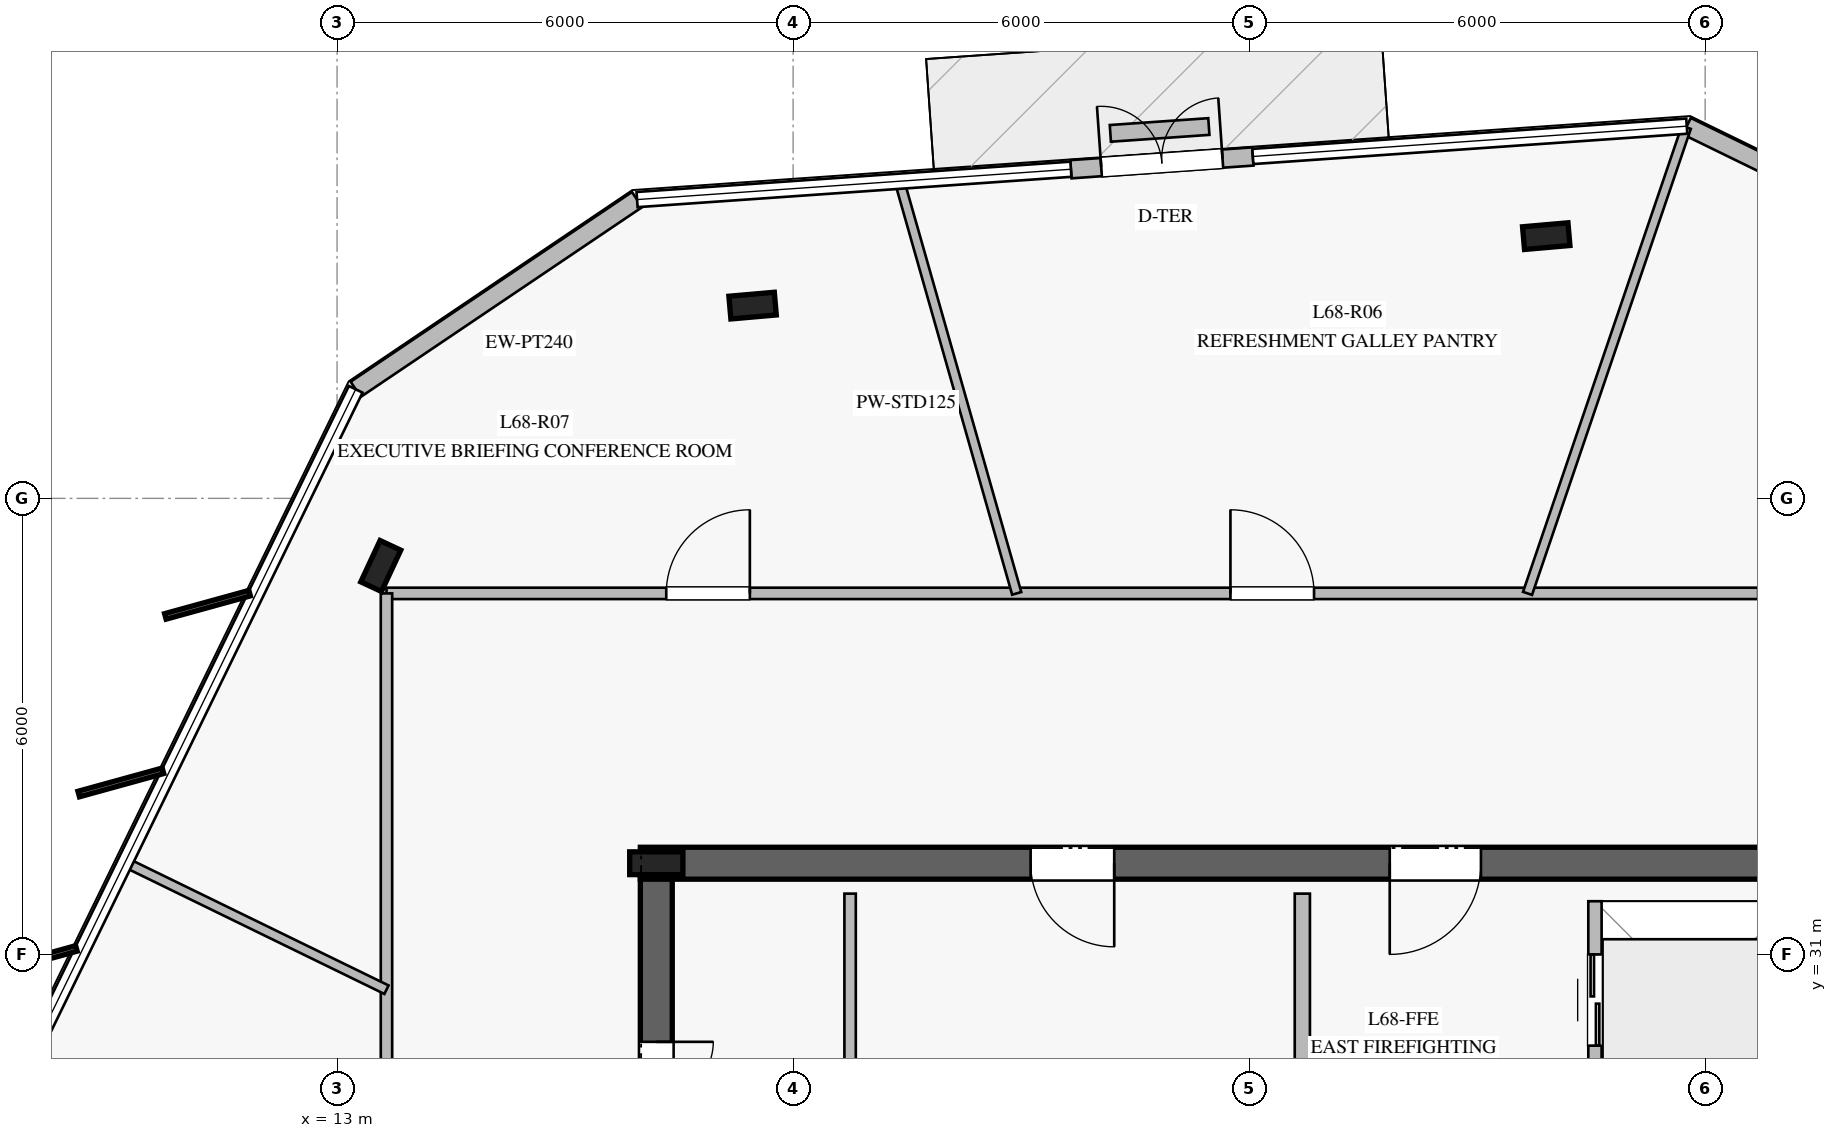
"""IFC4 building model, lengths in metres.
Left out: names, types, materials, properties, quantities, classifications, styles, units other than length and angle.
Written with IfcOpenShell. Run it as: python <this file> out.ifc"""

import sys

from ifc_helpers import new_model, si_unit, direction, frame, frame_2d, origin, origin_2d, place, context, subcontext, project, spatial, rectangle, i_section, extrude, element, fill, save


model = new_model("IFC4")
c1 = context("Model", 3, precision=1e-05, world=origin(), true_north=direction((0.0, 1.0)))
c2 = subcontext(c1, "Body", "Model", "MODEL_VIEW")
j1 = project(units=[si_unit("LENGTHUNIT", "METRE"), si_unit("PLANEANGLEUNIT", "RADIAN")], contexts=[c1])
p1 = place(None, origin())
s1 = spatial("IfcSite", under=j1, at=p1, CompositionType="ELEMENT")
p2 = place(p1, origin())
s2 = spatial("IfcBuilding", under=s1, at=p2, CompositionType="ELEMENT")
p3 = place(p2, frame((0.0, 0.0, 282.2)))
s3 = spatial("IfcBuildingStorey", under=s2, at=p3, CompositionType="ELEMENT", Elevation=282.2)
p4 = place(p3, frame((33.01, 32.2, 0.0), z_axis=(0.0, 0.0, 1.0), x_axis=(-1.0, 0.0, 0.0)))
e1 = element("IfcWall", 1, at=p4, inside=s3, PredefinedType="SHEAR", context=c2, shape_type="SweptSolid", body=[
    extrude(rectangle(XDim=16.02, YDim=0.42, at=frame_2d((8.01, 0.0))), origin(), (0.0, 0.0, 1.0), 3.78),
])
p5 = place(p4, frame((4.96, 0.0, 0.0)))
e2 = element("IfcOpeningElement", 2, at=p5, cuts=e1, PredefinedType="OPENING", context=c2, shape_type="SweptSolid", body=[
    extrude(rectangle(XDim=1.2, YDim=2.25, at=frame_2d((0.6, 1.125))), frame((0.0, 0.22, 0.0), z_axis=(0.0, -1.0, 0.0), x_axis=(1.0, 0.0, 0.0)), (0.0, 0.0, 1.0), 0.44),
])
p6 = place(p4, frame((9.785, 0.0, 0.0)))
e3 = element("IfcOpeningElement", 3, at=p6, cuts=e1, PredefinedType="OPENING", context=c2, shape_type="SweptSolid", body=[
    extrude(rectangle(XDim=1.1, YDim=2.2, at=frame_2d((0.55, 1.1))), frame((0.0, 0.22, 0.0), z_axis=(0.0, -1.0, 0.0), x_axis=(1.0, 0.0, 0.0)), (0.0, 0.0, 1.0), 0.44),
])
p7 = place(p3, frame((17.2, 31.99, 0.0), z_axis=(0.0, 0.0, 1.0), x_axis=(0.0, -1.0, 0.0)))
e4 = element("IfcWall", 4, at=p7, inside=s3, PredefinedType="SHEAR", context=c2, shape_type="SweptSolid", body=[
    extrude(rectangle(XDim=13.98, YDim=0.42, at=frame_2d((6.99, 0.0))), origin(), (0.0, 0.0, 1.0), 3.78),
])
p8 = place(p7, frame((2.14, 0.0, 0.0)))
e5 = element("IfcOpeningElement", 5, at=p8, cuts=e4, PredefinedType="OPENING", context=c2, shape_type="SweptSolid", body=[
    extrude(rectangle(XDim=1.5, YDim=2.2, at=frame_2d((0.75, 1.1))), frame((0.0, 0.22, 0.0), z_axis=(0.0, -1.0, 0.0), x_axis=(1.0, 0.0, 0.0)), (0.0, 0.0, 1.0), 0.44),
])
p9 = place(p3, frame((17.2, 32.2, 0.0), z_axis=(0.0, 0.0, 1.0), x_axis=(1.0, 0.0, 0.0)))
e6 = element("IfcColumn", 6, at=p9, inside=s3, PredefinedType="COLUMN", context=c2, shape_type="SweptSolid", body=[
    extrude(i_section(OverallWidth=0.3, OverallDepth=0.7, WebThickness=0.017, FlangeThickness=0.032, at=origin_2d()), origin(), (0.0, 0.0, 1.0), 4.0),
])
for number, where, z_axis, x_axis in (
    (7, (28.909, 40.45, 0.0), (0.0, 0.0, 1.0), (0.996, 0.087, 0.0)),
    (8, (18.467, 39.536, 0.0), (0.0, 0.0, 1.0), (0.996, 0.087, 0.0)),
    (9, (13.575, 36.11, 0.0), (0.0, 0.0, 1.0), (0.423, 0.906, 0.0)),
):
    element("IfcColumn", number, at=place(p3, frame(where, z_axis=z_axis, x_axis=x_axis)), inside=s3, PredefinedType="COLUMN", context=c2, shape_type="SweptSolid", body=[
        extrude(i_section(OverallWidth=0.3, OverallDepth=0.6, WebThickness=0.015, FlangeThickness=0.03, at=origin_2d()), origin(), (0.0, 0.0, 1.0), 4.0),
    ])
p10 = place(p3, frame((25.049, 41.498, 0.0), z_axis=(0.0, 0.0, 1.0), x_axis=(-0.99754775803, -0.069989073784, 0.0)))
e10 = element("IfcWall", 10, at=p10, inside=s3, PredefinedType="STANDARD", context=c2, shape_type="SweptSolid", body=[
    extrude(rectangle(XDim=2.4, YDim=0.24, at=frame_2d((1.2, 0.0))), origin(), (0.0, 0.0, 1.0), 3.78),
])
p11 = place(p10, frame((0.4, 0.0, 0.0)))
e11 = element("IfcOpeningElement", 11, at=p11, cuts=e10, PredefinedType="OPENING", context=c2, shape_type="SweptSolid", body=[
    extrude(rectangle(XDim=1.6, YDim=2.25, at=frame_2d((0.8, 1.125))), frame((0.0, 0.13, 0.0), z_axis=(0.0, -1.0, 0.0), x_axis=(1.0, 0.0, 0.0)), (0.0, 0.0, 1.0), 0.26),
])
p12 = place(p3, frame((16.947, 40.931, 0.0), z_axis=(0.0, 0.0, 1.0), x_axis=(-0.829153473241, -0.559021035214, 0.0)))
e12 = element("IfcWall", 12, at=p12, inside=s3, PredefinedType="STANDARD", context=c2, shape_type="SweptSolid", body=[
    extrude(rectangle(XDim=4.465, YDim=0.24, at=frame_2d((2.232, 0.0))), origin(), (0.0, 0.0, 1.0), 3.78),
])
p13 = place(p3, frame((34.77, 39.94, 0.0), z_axis=(0.0, 0.0, 1.0), x_axis=(-0.898770548201, 0.438419321754, 0.0)))
e13 = element("IfcWall", 13, at=p13, inside=s3, PredefinedType="STANDARD", context=c2, shape_type="SweptSolid", body=[
    extrude(rectangle(XDim=4.464, YDim=0.24, at=frame_2d((2.232, 0.0))), origin(), (0.0, 0.0, 1.0), 3.78),
])
p14 = place(p3, frame((24.47, 41.892, 0.0), z_axis=(0.0, 0.0, 1.0), x_axis=(-0.997592367101, -0.069350335995, 0.0)))
e14 = element("IfcWall", 14, at=p14, inside=s3, PredefinedType="USERDEFINED", context=c2, shape_type="SweptSolid", body=[
    extrude(rectangle(XDim=1.299, YDim=0.22, at=frame_2d((0.649, 0.0))), origin(), (0.0, 0.0, 1.0), 0.4),
])
p15 = place(p3, frame((25.7, 26.65, 0.0), z_axis=(0.0, 0.0, 1.0), x_axis=(0.0, 1.0, 0.0)))
e15 = element("IfcWall", 15, at=p15, inside=s3, PredefinedType="PARTITIONING", context=c2, shape_type="SweptSolid", body=[
    extrude(rectangle(XDim=5.15, YDim=0.2, at=frame_2d((2.575, 0.0))), origin(), (0.0, 0.0, 1.0), 3.78),
])
p16 = place(p3, frame((19.75, 29.39, 0.0), z_axis=(0.0, 0.0, 1.0), x_axis=(0.0, 1.0, 0.0)))
e16 = element("IfcWall", 16, at=p16, inside=s3, PredefinedType="PARTITIONING", context=c2, shape_type="SweptSolid", body=[
    extrude(rectangle(XDim=2.41, YDim=0.15, at=frame_2d((1.205, 0.0))), origin(), (0.0, 0.0, 1.0), 3.78),
])
p17 = place(p3, frame((29.55, 29.1, 0.0), z_axis=(0.0, 0.0, 1.0), x_axis=(0.0, 1.0, 0.0)))
e17 = element("IfcWall", 17, at=p17, inside=s3, PredefinedType="PARTITIONING", context=c2, shape_type="SweptSolid", body=[
    extrude(rectangle(XDim=2.6, YDim=0.175, at=frame_2d((1.3, 0.0))), origin(), (0.0, 0.0, 1.0), 3.78),
])
p18 = place(p17, frame((0.7, 0.0, 0.0)))
e18 = element("IfcOpeningElement", 18, at=p18, cuts=e17, PredefinedType="OPENING", context=c2, shape_type="SweptSolid", body=[
    extrude(rectangle(XDim=1.2, YDim=2.2, at=frame_2d((0.6, 1.1))), frame((0.0, 0.098, 0.0), z_axis=(0.0, -1.0, 0.0), x_axis=(1.0, 0.0, 0.0)), (0.0, 0.0, 1.0), 0.195),
])
p19 = place(p3, frame((13.65, 35.75, 0.0), z_axis=(0.0, 0.0, 1.0), x_axis=(1.0, 0.0, 0.0)))
e19 = element("IfcWall", 19, at=p19, inside=s3, PredefinedType="PARTITIONING", context=c2, shape_type="SweptSolid", body=[
    extrude(rectangle(XDim=22.7, YDim=0.15, at=frame_2d((11.35, 0.0))), origin(), (0.0, 0.0, 1.0), 3.28),
])
p20 = place(p19, frame((18.047, 0.0, 0.0)))
e20 = element("IfcOpeningElement", 20, at=p20, cuts=e19, PredefinedType="OPENING", context=c2, shape_type="SweptSolid", body=[
    extrude(rectangle(XDim=1.1, YDim=2.2, at=frame_2d((0.55, 1.1))), frame((0.0, 0.085, 0.0), z_axis=(0.0, -1.0, 0.0), x_axis=(1.0, 0.0, 0.0)), (0.0, 0.0, 1.0), 0.17),
])
p21 = place(p19, frame((11.104, 0.0, 0.0)))
e21 = element("IfcOpeningElement", 21, at=p21, cuts=e19, PredefinedType="OPENING", context=c2, shape_type="SweptSolid", body=[
    extrude(rectangle(XDim=1.1, YDim=2.2, at=frame_2d((0.55, 1.1))), frame((0.0, 0.085, 0.0), z_axis=(0.0, -1.0, 0.0), x_axis=(1.0, 0.0, 0.0)), (0.0, 0.0, 1.0), 0.17),
])
p22 = place(p19, frame((3.681, 0.0, 0.0)))
e22 = element("IfcOpeningElement", 22, at=p22, cuts=e19, PredefinedType="OPENING", context=c2, shape_type="SweptSolid", body=[
    extrude(rectangle(XDim=1.1, YDim=2.2, at=frame_2d((0.55, 1.1))), frame((0.0, 0.085, 0.0), z_axis=(0.0, -1.0, 0.0), x_axis=(1.0, 0.0, 0.0)), (0.0, 0.0, 1.0), 0.17),
])
p23 = place(p3, frame((13.65, 14.25, 0.0), z_axis=(0.0, 0.0, 1.0), x_axis=(0.0, 1.0, 0.0)))
e23 = element("IfcWall", 23, at=p23, inside=s3, PredefinedType="PARTITIONING", context=c2, shape_type="SweptSolid", body=[
    extrude(rectangle(XDim=21.5, YDim=0.15, at=frame_2d((10.75, 0.0))), origin(), (0.0, 0.0, 1.0), 3.05),
])
p24 = place(p23, frame((10.111, 0.0, 0.0)))
e24 = element("IfcOpeningElement", 24, at=p24, cuts=e23, PredefinedType="OPENING", context=c2, shape_type="SweptSolid", body=[
    extrude(rectangle(XDim=1.1, YDim=2.2, at=frame_2d((0.55, 1.1))), frame((0.0, 0.085, 0.0), z_axis=(0.0, -1.0, 0.0), x_axis=(1.0, 0.0, 0.0)), (0.0, 0.0, 1.0), 0.17),
])
p25 = place(p3, frame((21.942, 35.75, 0.0), z_axis=(0.0, 0.0, 1.0), x_axis=(-0.27356797667, 0.961852671744, 0.0)))
e25 = element("IfcWall", 25, at=p25, inside=s3, PredefinedType="PARTITIONING", context=c2, shape_type="SweptSolid", body=[
    extrude(rectangle(XDim=5.621, YDim=0.125, at=frame_2d((2.811, 0.0))), origin(), (0.0, 0.0, 1.0), 3.28),
])
p26 = place(p3, frame((13.65, 30.536, 0.0), z_axis=(0.0, 0.0, 1.0), x_axis=(-0.898817087616, 0.438323901938, 0.0)))
e26 = element("IfcWall", 26, at=p26, inside=s3, PredefinedType="PARTITIONING", context=c2, shape_type="SweptSolid", body=[
    extrude(rectangle(XDim=3.81, YDim=0.125, at=frame_2d((1.905, 0.0))), origin(), (0.0, 0.0, 1.0), 3.05),
])
p27 = place(p3, frame((28.663, 35.75, 0.0), z_axis=(0.0, 0.0, 1.0), x_axis=(0.322496640265, 0.946570608575, 0.0)))
e27 = element("IfcWall", 27, at=p27, inside=s3, PredefinedType="PARTITIONING", context=c2, shape_type="SweptSolid", body=[
    extrude(rectangle(XDim=6.477, YDim=0.125, at=frame_2d((3.239, 0.0))), origin(), (0.0, 0.0, 1.0), 3.28),
])
p28 = place(p11, frame((1.6, 0.0, 0.0), z_axis=(0.0, 0.0, 1.0), x_axis=(-1.0, 0.0, 0.0)))
e28 = element("IfcDoor", 28, at=p28, inside=s3, OperationType="DOUBLE_DOOR_SINGLE_SWING", PredefinedType="DOOR", context=c2, shape_type="SweptSolid", body=[
    extrude(rectangle(XDim=1.6, YDim=2.25, at=frame_2d((0.8, 1.125))), frame((0.0, 0.025, 0.0), z_axis=(0.0, -1.0, 0.0), x_axis=(1.0, 0.0, 0.0)), (0.0, 0.0, 1.0), 0.05),
])
fill(e11, e28)
p29 = place(p5, origin())
e29 = element("IfcDoor", 29, at=p29, inside=s3, OperationType="SINGLE_SWING_RIGHT", PredefinedType="DOOR", context=c2, shape_type="SweptSolid", body=[
    extrude(rectangle(XDim=1.2, YDim=2.25, at=frame_2d((0.6, 1.125))), frame((0.0, 0.025, 0.0), z_axis=(0.0, -1.0, 0.0), x_axis=(1.0, 0.0, 0.0)), (0.0, 0.0, 1.0), 0.05),
])
fill(e2, e29)
p30 = place(p8, origin())
e30 = element("IfcDoor", 30, at=p30, inside=s3, OperationType="DOUBLE_DOOR_SINGLE_SWING", PredefinedType="DOOR", context=c2, shape_type="SweptSolid", body=[
    extrude(rectangle(XDim=1.5, YDim=2.2, at=frame_2d((0.75, 1.1))), frame((0.0, 0.025, 0.0), z_axis=(0.0, -1.0, 0.0), x_axis=(1.0, 0.0, 0.0)), (0.0, 0.0, 1.0), 0.05),
])
fill(e5, e30)
p31 = place(p6, origin())
e31 = element("IfcDoor", 31, at=p31, inside=s3, OperationType="SINGLE_SWING_LEFT", PredefinedType="DOOR", context=c2, shape_type="SweptSolid", body=[
    extrude(rectangle(XDim=1.1, YDim=2.2, at=frame_2d((0.55, 1.1))), frame((0.0, 0.025, 0.0), z_axis=(0.0, -1.0, 0.0), x_axis=(1.0, 0.0, 0.0)), (0.0, 0.0, 1.0), 0.05),
])
fill(e3, e31)
p32 = place(p18, origin())
e32 = element("IfcDoor", 32, at=p32, inside=s3, OperationType="DOUBLE_DOOR_SLIDING", PredefinedType="DOOR", context=c2, shape_type="SweptSolid", body=[
    extrude(rectangle(XDim=1.2, YDim=2.2, at=frame_2d((0.6, 1.1))), frame((0.0, 0.025, 0.0), z_axis=(0.0, -1.0, 0.0), x_axis=(1.0, 0.0, 0.0)), (0.0, 0.0, 1.0), 0.05),
])
fill(e18, e32)
p33 = place(p21, origin())
e33 = element("IfcDoor", 33, at=p33, inside=s3, OperationType="SINGLE_SWING_LEFT", PredefinedType="DOOR", context=c2, shape_type="SweptSolid", body=[
    extrude(rectangle(XDim=1.1, YDim=2.2, at=frame_2d((0.55, 1.1))), frame((0.0, 0.025, 0.0), z_axis=(0.0, -1.0, 0.0), x_axis=(1.0, 0.0, 0.0)), (0.0, 0.0, 1.0), 0.05),
])
fill(e21, e33)
p34 = place(p22, origin())
e34 = element("IfcDoor", 34, at=p34, inside=s3, OperationType="SINGLE_SWING_RIGHT", PredefinedType="DOOR", context=c2, shape_type="SweptSolid", body=[
    extrude(rectangle(XDim=1.1, YDim=2.2, at=frame_2d((0.55, 1.1))), frame((0.0, 0.025, 0.0), z_axis=(0.0, -1.0, 0.0), x_axis=(1.0, 0.0, 0.0)), (0.0, 0.0, 1.0), 0.05),
])
fill(e22, e34)
save(model, sys.argv[1])
